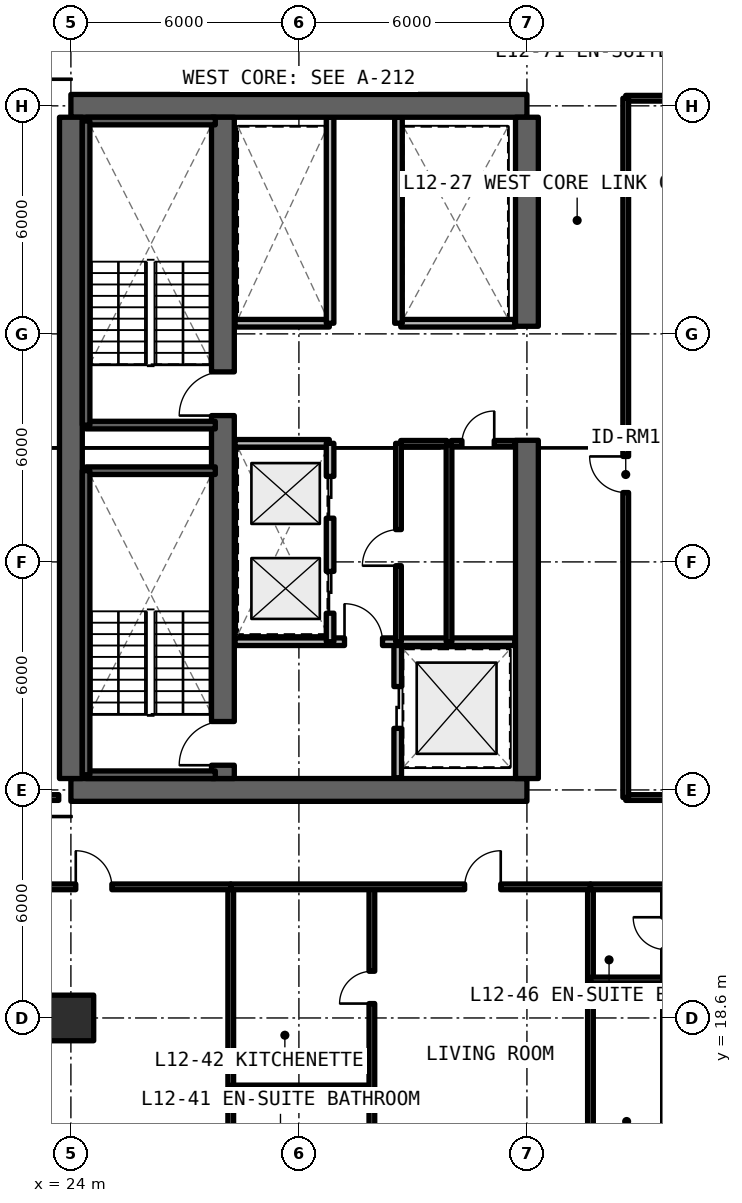
"""IFC4 building model, lengths in metres.
Left out: names, types, materials, properties, quantities, classifications, styles, units other than length and angle.
Written with IfcOpenShell. Run it as: python <this file> out.ifc"""

import sys

from ifc_helpers import new_model, si_unit, direction, frame, frame_2d, origin, origin_2d, place, context, subcontext, project, spatial, rectangle, extrude, element, fill, save


model = new_model("IFC4")
c1 = context("Model", 3, precision=1e-05, world=origin(), true_north=direction((0.0, 1.0)))
c2 = subcontext(c1, "Body", "Model", "MODEL_VIEW")
j1 = project(units=[si_unit("LENGTHUNIT", "METRE"), si_unit("PLANEANGLEUNIT", "RADIAN")], contexts=[c1])
p1 = place(None, origin())
s1 = spatial("IfcSite", under=j1, at=p1, CompositionType="ELEMENT")
p2 = place(p1, origin())
s2 = spatial("IfcBuilding", under=s1, at=p2, CompositionType="ELEMENT")
p3 = place(p2, frame((0.0, 0.0, 45.54)))
s3 = spatial("IfcBuildingStorey", under=s2, at=p3, CompositionType="ELEMENT", Elevation=45.54)
for number, where, z_axis, x_axis in (
    (1, (24.0, 24.6, 0.0), (0.0, 0.0, 1.0), (1.0, 0.0, 0.0)),
    (2, (36.0, 42.6, 0.0), (0.0, 0.0, 1.0), (-1.0, 0.0, 0.0)),
):
    element("IfcWall", number, at=place(p3, frame(where, z_axis=z_axis, x_axis=x_axis)), inside=s3, PredefinedType="SHEAR", context=c2, shape_type="SweptSolid", body=[
        extrude(rectangle(XDim=12.0, YDim=0.6, at=frame_2d((6.0, 0.0))), origin(), (0.0, 0.0, 1.0), 3.3),
    ])
p4 = place(p3, frame((24.0, 24.9, 0.0), z_axis=(0.0, 0.0, 1.0), x_axis=(0.0, 1.0, 0.0)))
e3 = element("IfcWall", 3, at=p4, inside=s3, PredefinedType="SHEAR", context=c2, shape_type="SweptSolid", body=[
    extrude(rectangle(XDim=17.4, YDim=0.6, at=frame_2d((8.7, 0.0))), origin(), (0.0, 0.0, 1.0), 3.3),
])
p5 = place(p3, frame((36.0, 24.9, 0.0), z_axis=(0.0, 0.0, 1.0), x_axis=(0.0, 1.0, 0.0)))
e4 = element("IfcWall", 4, at=p5, inside=s3, PredefinedType="SHEAR", context=c2, shape_type="SweptSolid", body=[
    extrude(rectangle(XDim=8.9, YDim=0.6, at=frame_2d((4.45, 0.0))), origin(), (0.0, 0.0, 1.0), 3.3),
])
p6 = place(p3, frame((36.0, 36.8, 0.0), z_axis=(0.0, 0.0, 1.0), x_axis=(0.0, 1.0, 0.0)))
e5 = element("IfcWall", 5, at=p6, inside=s3, PredefinedType="SHEAR", context=c2, shape_type="SweptSolid", body=[
    extrude(rectangle(XDim=5.5, YDim=0.6, at=frame_2d((2.75, 0.0))), origin(), (0.0, 0.0, 1.0), 3.3),
])
p7 = place(p3, frame((28.0, 24.9, 0.0), z_axis=(0.0, 0.0, 1.0), x_axis=(0.0, 1.0, 0.0)))
e6 = element("IfcWall", 6, at=p7, inside=s3, PredefinedType="SHEAR", context=c2, shape_type="SweptSolid", body=[
    extrude(rectangle(XDim=17.4, YDim=0.6, at=frame_2d((8.7, 0.0))), origin(), (0.0, 0.0, 1.0), 3.3),
])
p8 = place(p7, frame((0.35, 0.0, 0.0)))
e7 = element("IfcOpeningElement", 7, at=p8, cuts=e6, PredefinedType="OPENING", context=c2, shape_type="SweptSolid", body=[
    extrude(rectangle(XDim=1.15, YDim=2.15, at=frame_2d((0.575, 1.075))), frame((0.0, 0.31, 0.0), z_axis=(0.0, -1.0, 0.0), x_axis=(1.0, 0.0, 0.0)), (0.0, 0.0, 1.0), 0.62),
])
p9 = place(p7, frame((9.55, 0.0, 0.0)))
e8 = element("IfcOpeningElement", 8, at=p9, cuts=e6, PredefinedType="OPENING", context=c2, shape_type="SweptSolid", body=[
    extrude(rectangle(XDim=1.15, YDim=2.15, at=frame_2d((0.575, 1.075))), frame((0.0, 0.31, 0.0), z_axis=(0.0, -1.0, 0.0), x_axis=(1.0, 0.0, 0.0)), (0.0, 0.0, 1.0), 0.62),
])
p10 = place(p3, frame((24.0, 18.6, 0.0), z_axis=(0.0, 0.0, 1.0), x_axis=(1.0, 0.0, 0.0)))
e9 = element("IfcColumn", 9, at=p10, inside=s3, PredefinedType="COLUMN", context=c2, shape_type="SweptSolid", body=[
    extrude(rectangle(XDim=1.2, YDim=1.2, at=origin_2d()), origin(), (0.0, 0.0, 1.0), 3.3),
])
p11 = place(p3, frame((32.6, 24.92, 0.0), z_axis=(0.0, 0.0, 1.0), x_axis=(0.0, 1.0, 0.0)))
e10 = element("IfcWall", 10, at=p11, inside=s3, PredefinedType="SOLIDWALL", context=c2, shape_type="SweptSolid", body=[
    extrude(rectangle(XDim=3.58, YDim=0.2, at=frame_2d((1.79, 0.0))), origin(), (0.0, 0.0, 1.0), 2.35),
])
p12 = place(p11, frame((1.3, 0.0, 0.0)))
e11 = element("IfcOpeningElement", 11, at=p12, cuts=e10, PredefinedType="OPENING", context=c2, shape_type="SweptSolid", body=[
    extrude(rectangle(XDim=1.1, YDim=2.2, at=frame_2d((0.55, 1.1))), frame((0.0, 0.11, 0.0), z_axis=(0.0, -1.0, 0.0), x_axis=(1.0, 0.0, 0.0)), (0.0, 0.0, 1.0), 0.22),
])
p13 = place(p3, frame((28.32, 28.5, 0.0), z_axis=(0.0, 0.0, 1.0), x_axis=(1.0, 0.0, 0.0)))
e12 = element("IfcWall", 12, at=p13, inside=s3, PredefinedType="SOLIDWALL", context=c2, shape_type="SweptSolid", body=[
    extrude(rectangle(XDim=7.36, YDim=0.2, at=frame_2d((3.68, 0.0))), origin(), (0.0, 0.0, 1.0), 2.35),
])
p14 = place(p13, frame((2.88, 0.0, 0.0)))
e13 = element("IfcOpeningElement", 13, at=p14, cuts=e12, PredefinedType="OPENING", context=c2, shape_type="SweptSolid", body=[
    extrude(rectangle(XDim=1.0, YDim=2.15, at=frame_2d((0.5, 1.075))), frame((0.0, 0.11, 0.0), z_axis=(0.0, -1.0, 0.0), x_axis=(1.0, 0.0, 0.0)), (0.0, 0.0, 1.0), 0.22),
])
p15 = place(p3, frame((28.32, 33.72, 0.0), z_axis=(0.0, 0.0, 1.0), x_axis=(1.0, 0.0, 0.0)))
e14 = element("IfcWall", 14, at=p15, inside=s3, PredefinedType="SOLIDWALL", context=c2, shape_type="SweptSolid", body=[
    extrude(rectangle(XDim=2.48, YDim=0.2, at=frame_2d((1.24, 0.0))), origin(), (0.0, 0.0, 1.0), 2.35),
])
p16 = place(p3, frame((30.82, 28.5, 0.0), z_axis=(0.0, 0.0, 1.0), x_axis=(0.0, 1.0, 0.0)))
e15 = element("IfcWall", 15, at=p16, inside=s3, PredefinedType="SOLIDWALL", context=c2, shape_type="SweptSolid", body=[
    extrude(rectangle(XDim=5.22, YDim=0.2, at=frame_2d((2.61, 0.0))), origin(), (0.0, 0.0, 1.0), 2.35),
])
p17 = place(p16, frame((0.75, 0.0, 0.0)))
e16 = element("IfcOpeningElement", 16, at=p17, cuts=e15, PredefinedType="OPENING", context=c2, shape_type="SweptSolid", body=[
    extrude(rectangle(XDim=1.1, YDim=2.2, at=frame_2d((0.55, 1.1))), frame((0.0, 0.11, 0.0), z_axis=(0.0, -1.0, 0.0), x_axis=(1.0, 0.0, 0.0)), (0.0, 0.0, 1.0), 0.22),
])
p18 = place(p16, frame((3.25, 0.0, 0.0)))
e17 = element("IfcOpeningElement", 17, at=p18, cuts=e15, PredefinedType="OPENING", context=c2, shape_type="SweptSolid", body=[
    extrude(rectangle(XDim=1.1, YDim=2.2, at=frame_2d((0.55, 1.1))), frame((0.0, 0.11, 0.0), z_axis=(0.0, -1.0, 0.0), x_axis=(1.0, 0.0, 0.0)), (0.0, 0.0, 1.0), 0.22),
])
p19 = place(p3, frame((33.95, 28.5, 0.0), z_axis=(0.0, 0.0, 1.0), x_axis=(0.0, 1.0, 0.0)))
e18 = element("IfcWall", 18, at=p19, inside=s3, PredefinedType="SOLIDWALL", context=c2, shape_type="SweptSolid", body=[
    extrude(rectangle(XDim=5.22, YDim=0.15, at=frame_2d((2.61, 0.0))), origin(), (0.0, 0.0, 1.0), 2.35),
])
p20 = place(p3, frame((32.68, 33.72, 0.0), z_axis=(0.0, 0.0, 1.0), x_axis=(1.0, 0.0, 0.0)))
e19 = element("IfcWall", 19, at=p20, inside=s3, PredefinedType="SOLIDWALL", context=c2, shape_type="SweptSolid", body=[
    extrude(rectangle(XDim=1.21, YDim=0.15, at=frame_2d((0.605, 0.0))), origin(), (0.0, 0.0, 1.0), 2.35),
])
p21 = place(p3, frame((34.01, 33.72, 0.0), z_axis=(0.0, 0.0, 1.0), x_axis=(1.0, 0.0, 0.0)))
e20 = element("IfcWall", 20, at=p21, inside=s3, PredefinedType="SOLIDWALL", context=c2, shape_type="SweptSolid", body=[
    extrude(rectangle(XDim=1.67, YDim=0.15, at=frame_2d((0.835, 0.0))), origin(), (0.0, 0.0, 1.0), 2.35),
])
p22 = place(p21, frame((0.28, 0.0, 0.0)))
e21 = element("IfcOpeningElement", 21, at=p22, cuts=e20, PredefinedType="OPENING", context=c2, shape_type="SweptSolid", body=[
    extrude(rectangle(XDim=0.85, YDim=2.1, at=frame_2d((0.425, 1.05))), frame((0.0, 0.085, 0.0), z_axis=(0.0, -1.0, 0.0), x_axis=(1.0, 0.0, 0.0)), (0.0, 0.0, 1.0), 0.17),
])
p23 = place(p3, frame((32.62, 28.5, 0.0), z_axis=(0.0, 0.0, 1.0), x_axis=(0.0, 1.0, 0.0)))
e22 = element("IfcWall", 22, at=p23, inside=s3, PredefinedType="SOLIDWALL", context=c2, shape_type="SweptSolid", body=[
    extrude(rectangle(XDim=5.22, YDim=0.15, at=frame_2d((2.61, 0.0))), origin(), (0.0, 0.0, 1.0), 2.35),
])
p24 = place(p23, frame((2.0, 0.0, 0.0)))
e23 = element("IfcOpeningElement", 23, at=p24, cuts=e22, PredefinedType="OPENING", context=c2, shape_type="SweptSolid", body=[
    extrude(rectangle(XDim=0.95, YDim=2.15, at=frame_2d((0.475, 1.075))), frame((0.0, 0.085, 0.0), z_axis=(0.0, -1.0, 0.0), x_axis=(1.0, 0.0, 0.0)), (0.0, 0.0, 1.0), 0.17),
])
p25 = place(p3, frame((28.32, 36.88, 0.0), z_axis=(0.0, 0.0, 1.0), x_axis=(1.0, 0.0, 0.0)))
e24 = element("IfcWall", 24, at=p25, inside=s3, PredefinedType="SOLIDWALL", context=c2, shape_type="SweptSolid", body=[
    extrude(rectangle(XDim=2.48, YDim=0.2, at=frame_2d((1.24, 0.0))), origin(), (0.0, 0.0, 1.0), 2.35),
])
p26 = place(p3, frame((30.82, 36.88, 0.0), z_axis=(0.0, 0.0, 1.0), x_axis=(0.0, 1.0, 0.0)))
e25 = element("IfcWall", 25, at=p26, inside=s3, PredefinedType="SOLIDWALL", context=c2, shape_type="SweptSolid", body=[
    extrude(rectangle(XDim=5.42, YDim=0.2, at=frame_2d((2.71, 0.0))), origin(), (0.0, 0.0, 1.0), 2.35),
])
p27 = place(p3, frame((32.68, 36.88, 0.0), z_axis=(0.0, 0.0, 1.0), x_axis=(1.0, 0.0, 0.0)))
e26 = element("IfcWall", 26, at=p27, inside=s3, PredefinedType="SOLIDWALL", context=c2, shape_type="SweptSolid", body=[
    extrude(rectangle(XDim=3.0, YDim=0.2, at=frame_2d((1.5, 0.0))), origin(), (0.0, 0.0, 1.0), 2.35),
])
p28 = place(p3, frame((32.62, 36.88, 0.0), z_axis=(0.0, 0.0, 1.0), x_axis=(0.0, 1.0, 0.0)))
e27 = element("IfcWall", 27, at=p28, inside=s3, PredefinedType="SOLIDWALL", context=c2, shape_type="SweptSolid", body=[
    extrude(rectangle(XDim=5.42, YDim=0.2, at=frame_2d((2.71, 0.0))), origin(), (0.0, 0.0, 1.0), 2.35),
])
for number, where, z_axis, x_axis in (
    (28, (38.6, 24.4, 0.0), (0.0, 0.0, 1.0), (1.0, 0.0, 0.0)),
    (29, (38.6, 42.8, 0.0), (0.0, 0.0, 1.0), (1.0, 0.0, 0.0)),
):
    element("IfcWall", number, at=place(p3, frame(where, z_axis=z_axis, x_axis=x_axis)), inside=s3, PredefinedType="SOLIDWALL", context=c2, shape_type="SweptSolid", body=[
        extrude(rectangle(XDim=8.25, YDim=0.15, at=frame_2d((4.125, 0.0))), origin(), (0.0, 0.0, 1.0), 2.295),
    ])
p29 = place(p3, frame((38.6, 24.4, 0.0), z_axis=(0.0, 0.0, 1.0), x_axis=(0.0, 1.0, 0.0)))
e30 = element("IfcWall", 30, at=p29, inside=s3, PredefinedType="SOLIDWALL", context=c2, shape_type="SweptSolid", body=[
    extrude(rectangle(XDim=18.4, YDim=0.15, at=frame_2d((9.2, 0.0))), origin(), (0.0, 0.0, 1.0), 2.35),
])
p30 = place(p29, frame((8.025, 0.0, 0.0)))
e31 = element("IfcOpeningElement", 31, at=p30, cuts=e30, PredefinedType="OPENING", context=c2, shape_type="SweptSolid", body=[
    extrude(rectangle(XDim=0.95, YDim=2.15, at=frame_2d((0.475, 1.075))), frame((0.0, 0.085, 0.0), z_axis=(0.0, -1.0, 0.0), x_axis=(1.0, 0.0, 0.0)), (0.0, 0.0, 1.0), 0.17),
])
p31 = place(p3, frame((16.84, 24.4, 0.0), z_axis=(0.0, 0.0, 1.0), x_axis=(1.0, 0.0, 0.0)))
e32 = element("IfcWall", 32, at=p31, inside=s3, PredefinedType="SOLIDWALL", context=c2, shape_type="SweptSolid", body=[
    extrude(rectangle(XDim=6.84, YDim=0.15, at=frame_2d((3.42, 0.0))), origin(), (0.0, 0.0, 1.0), 2.295),
])
p32 = place(p31, frame((2.945, 0.0, 0.0)))
e33 = element("IfcOpeningElement", 33, at=p32, cuts=e32, PredefinedType="OPENING", context=c2, shape_type="SweptSolid", body=[
    extrude(rectangle(XDim=0.95, YDim=2.15, at=frame_2d((0.475, 1.075))), frame((0.0, 0.085, 0.0), z_axis=(0.0, -1.0, 0.0), x_axis=(1.0, 0.0, 0.0)), (0.0, 0.0, 1.0), 0.17),
])
p33 = place(p3, frame((28.207, 7.88, 0.0), z_axis=(0.0, 0.0, 1.0), x_axis=(0.0, 1.0, 0.0)))
e34 = element("IfcWall", 34, at=p33, inside=s3, PredefinedType="SOLIDWALL", context=c2, shape_type="SweptSolid", body=[
    extrude(rectangle(XDim=14.17, YDim=0.15, at=frame_2d((7.085, 0.0))), origin(), (0.0, 0.0, 1.0), 2.35),
])
p34 = place(p3, frame((21.0, 22.05, 0.0), z_axis=(0.0, 0.0, 1.0), x_axis=(1.0, 0.0, 0.0)))
e35 = element("IfcWall", 35, at=p34, inside=s3, PredefinedType="SOLIDWALL", context=c2, shape_type="SweptSolid", body=[
    extrude(rectangle(XDim=7.207, YDim=0.15, at=frame_2d((3.603, 0.0))), origin(), (0.0, 0.0, 1.0), 2.35),
])
p35 = place(p34, frame((3.128, 0.0, 0.0)))
e36 = element("IfcOpeningElement", 36, at=p35, cuts=e35, PredefinedType="OPENING", context=c2, shape_type="SweptSolid", body=[
    extrude(rectangle(XDim=0.95, YDim=2.15, at=frame_2d((0.475, 1.075))), frame((0.0, 0.085, 0.0), z_axis=(0.0, -1.0, 0.0), x_axis=(1.0, 0.0, 0.0)), (0.0, 0.0, 1.0), 0.17),
])
p36 = place(p3, frame((37.672, 7.88, 0.0), z_axis=(0.0, 0.0, 1.0), x_axis=(0.0, 1.0, 0.0)))
e37 = element("IfcWall", 37, at=p36, inside=s3, PredefinedType="SOLIDWALL", context=c2, shape_type="SweptSolid", body=[
    extrude(rectangle(XDim=14.17, YDim=0.15, at=frame_2d((7.085, 0.0))), origin(), (0.0, 0.0, 1.0), 2.35),
])
p37 = place(p3, frame((28.207, 16.758, 0.0), z_axis=(0.0, 0.0, 1.0), x_axis=(1.0, 0.0, 0.0)))
e38 = element("IfcWall", 38, at=p37, inside=s3, PredefinedType="PARTITIONING", context=c2, shape_type="SweptSolid", body=[
    extrude(rectangle(XDim=3.713, YDim=0.15, at=frame_2d((1.857, 0.0))), origin(), (0.0, 0.0, 1.0), 2.35),
])
p38 = place(p3, frame((31.92, 13.08, 0.0), z_axis=(0.0, 0.0, 1.0), x_axis=(0.0, 1.0, 0.0)))
e39 = element("IfcWall", 39, at=p38, inside=s3, PredefinedType="PARTITIONING", context=c2, shape_type="SweptSolid", body=[
    extrude(rectangle(XDim=8.97, YDim=0.15, at=frame_2d((4.485, 0.0))), origin(), (0.0, 0.0, 1.0), 2.35),
])
p39 = place(p38, frame((1.414, 0.0, 0.0)))
e40 = element("IfcOpeningElement", 40, at=p39, cuts=e39, PredefinedType="OPENING", context=c2, shape_type="SweptSolid", body=[
    extrude(rectangle(XDim=0.85, YDim=2.1, at=frame_2d((0.425, 1.05))), frame((0.0, 0.085, 0.0), z_axis=(0.0, -1.0, 0.0), x_axis=(1.0, 0.0, 0.0)), (0.0, 0.0, 1.0), 0.17),
])
p40 = place(p38, frame((5.899, 0.0, 0.0)))
e41 = element("IfcOpeningElement", 41, at=p40, cuts=e39, PredefinedType="OPENING", context=c2, shape_type="SweptSolid", body=[
    extrude(rectangle(XDim=0.85, YDim=2.1, at=frame_2d((0.425, 1.05))), frame((0.0, 0.085, 0.0), z_axis=(0.0, -1.0, 0.0), x_axis=(1.0, 0.0, 0.0)), (0.0, 0.0, 1.0), 0.17),
])
p41 = place(p3, frame((28.207, 22.05, 0.0), z_axis=(0.0, 0.0, 1.0), x_axis=(1.0, 0.0, 0.0)))
e42 = element("IfcWall", 42, at=p41, inside=s3, PredefinedType="SOLIDWALL", context=c2, shape_type="SweptSolid", body=[
    extrude(rectangle(XDim=9.465, YDim=0.15, at=frame_2d((4.733, 0.0))), origin(), (0.0, 0.0, 1.0), 2.35),
])
p42 = place(p41, frame((6.154, 0.0, 0.0)))
e43 = element("IfcOpeningElement", 43, at=p42, cuts=e42, PredefinedType="OPENING", context=c2, shape_type="SweptSolid", body=[
    extrude(rectangle(XDim=0.95, YDim=2.15, at=frame_2d((0.475, 1.075))), frame((0.0, 0.085, 0.0), z_axis=(0.0, -1.0, 0.0), x_axis=(1.0, 0.0, 0.0)), (0.0, 0.0, 1.0), 0.17),
])
p43 = place(p3, frame((37.672, 19.6, 0.0), z_axis=(0.0, 0.0, 1.0), x_axis=(1.0, 0.0, 0.0)))
e44 = element("IfcWall", 44, at=p43, inside=s3, PredefinedType="PARTITIONING", context=c2, shape_type="SweptSolid", body=[
    extrude(rectangle(XDim=1.975, YDim=0.15, at=frame_2d((0.987, 0.0))), origin(), (0.0, 0.0, 1.0), 2.35),
])
p44 = place(p3, frame((37.672, 22.05, 0.0), z_axis=(0.0, 0.0, 1.0), x_axis=(1.0, 0.0, 0.0)))
e45 = element("IfcWall", 45, at=p44, inside=s3, PredefinedType="SOLIDWALL", context=c2, shape_type="SweptSolid", body=[
    extrude(rectangle(XDim=5.808, YDim=0.15, at=frame_2d((2.904, 0.0))), origin(), (0.0, 0.0, 1.0), 2.35),
])
p45 = place(p44, frame((3.457, 0.0, 0.0)))
e46 = element("IfcOpeningElement", 46, at=p45, cuts=e45, PredefinedType="OPENING", context=c2, shape_type="SweptSolid", body=[
    extrude(rectangle(XDim=0.95, YDim=2.15, at=frame_2d((0.475, 1.075))), frame((0.0, 0.085, 0.0), z_axis=(0.0, -1.0, 0.0), x_axis=(1.0, 0.0, 0.0)), (0.0, 0.0, 1.0), 0.17),
])
for number, where, z_axis, x_axis in (
    (47, (24.4, 25.0, 0.0), (0.0, 0.0, 1.0), (1.0, 0.0, 0.0)),
    (48, (27.8, 33.0, 0.0), (0.0, 0.0, 1.0), (-1.0, 0.0, 0.0)),
):
    element("IfcWall", number, at=place(p3, frame(where, z_axis=z_axis, x_axis=x_axis)), inside=s3, PredefinedType="SOLIDWALL", context=c2, shape_type="SweptSolid", body=[
        extrude(rectangle(XDim=3.4, YDim=0.2, at=frame_2d((1.7, 0.0))), origin(), (0.0, 0.0, 1.0), 3.3),
    ])
p46 = place(p3, frame((24.4, 33.0, 0.0), z_axis=(0.0, 0.0, 1.0), x_axis=(0.0, -1.0, 0.0)))
e49 = element("IfcWall", 49, at=p46, inside=s3, PredefinedType="SOLIDWALL", context=c2, shape_type="SweptSolid", body=[
    extrude(rectangle(XDim=8.0, YDim=0.2, at=frame_2d((4.0, 0.0))), origin(), (0.0, 0.0, 1.0), 3.3),
])
for number, where, z_axis, x_axis in (
    (50, (24.4, 34.2, 0.0), (0.0, 0.0, 1.0), (1.0, 0.0, 0.0)),
    (51, (27.8, 42.2, 0.0), (0.0, 0.0, 1.0), (-1.0, 0.0, 0.0)),
):
    element("IfcWall", number, at=place(p3, frame(where, z_axis=z_axis, x_axis=x_axis)), inside=s3, PredefinedType="SOLIDWALL", context=c2, shape_type="SweptSolid", body=[
        extrude(rectangle(XDim=3.4, YDim=0.2, at=frame_2d((1.7, 0.0))), origin(), (0.0, 0.0, 1.0), 3.3),
    ])
p47 = place(p3, frame((24.4, 42.2, 0.0), z_axis=(0.0, 0.0, 1.0), x_axis=(0.0, -1.0, 0.0)))
e52 = element("IfcWall", 52, at=p47, inside=s3, PredefinedType="SOLIDWALL", context=c2, shape_type="SweptSolid", body=[
    extrude(rectangle(XDim=8.0, YDim=0.2, at=frame_2d((4.0, 0.0))), origin(), (0.0, 0.0, 1.0), 3.3),
])
p48 = place(p12, origin())
e53 = element("IfcDoor", 53, at=p48, inside=s3, OperationType="SLIDING_TO_LEFT", PredefinedType="DOOR", context=c2, shape_type="SweptSolid", body=[
    extrude(rectangle(XDim=1.1, YDim=2.2, at=frame_2d((0.55, 1.1))), frame((0.0, 0.025, 0.0), z_axis=(0.0, -1.0, 0.0), x_axis=(1.0, 0.0, 0.0)), (0.0, 0.0, 1.0), 0.05),
])
fill(e11, e53)
p49 = place(p14, origin())
e54 = element("IfcDoor", 54, at=p49, inside=s3, OperationType="SINGLE_SWING_LEFT", PredefinedType="DOOR", context=c2, shape_type="SweptSolid", body=[
    extrude(rectangle(XDim=1.0, YDim=2.15, at=frame_2d((0.5, 1.075))), frame((0.0, 0.025, 0.0), z_axis=(0.0, -1.0, 0.0), x_axis=(1.0, 0.0, 0.0)), (0.0, 0.0, 1.0), 0.05),
])
fill(e13, e54)
p50 = place(p17, origin())
e55 = element("IfcDoor", 55, at=p50, inside=s3, OperationType="SLIDING_TO_LEFT", PredefinedType="DOOR", context=c2, shape_type="SweptSolid", body=[
    extrude(rectangle(XDim=1.1, YDim=2.2, at=frame_2d((0.55, 1.1))), frame((0.0, 0.025, 0.0), z_axis=(0.0, -1.0, 0.0), x_axis=(1.0, 0.0, 0.0)), (0.0, 0.0, 1.0), 0.05),
])
fill(e16, e55)
p51 = place(p18, origin())
e56 = element("IfcDoor", 56, at=p51, inside=s3, OperationType="SLIDING_TO_RIGHT", PredefinedType="DOOR", context=c2, shape_type="SweptSolid", body=[
    extrude(rectangle(XDim=1.1, YDim=2.2, at=frame_2d((0.55, 1.1))), frame((0.0, 0.025, 0.0), z_axis=(0.0, -1.0, 0.0), x_axis=(1.0, 0.0, 0.0)), (0.0, 0.0, 1.0), 0.05),
])
fill(e17, e56)
p52 = place(p22, origin())
e57 = element("IfcDoor", 57, at=p52, inside=s3, OperationType="SINGLE_SWING_RIGHT", PredefinedType="DOOR", context=c2, shape_type="SweptSolid", body=[
    extrude(rectangle(XDim=0.85, YDim=2.1, at=frame_2d((0.425, 1.05))), frame((0.0, 0.025, 0.0), z_axis=(0.0, -1.0, 0.0), x_axis=(1.0, 0.0, 0.0)), (0.0, 0.0, 1.0), 0.05),
])
fill(e21, e57)
p53 = place(p24, origin())
e58 = element("IfcDoor", 58, at=p53, inside=s3, OperationType="SINGLE_SWING_LEFT", PredefinedType="DOOR", context=c2, shape_type="SweptSolid", body=[
    extrude(rectangle(XDim=0.95, YDim=2.15, at=frame_2d((0.475, 1.075))), frame((0.0, 0.025, 0.0), z_axis=(0.0, -1.0, 0.0), x_axis=(1.0, 0.0, 0.0)), (0.0, 0.0, 1.0), 0.05),
])
fill(e23, e58)
p54 = place(p30, origin())
e59 = element("IfcDoor", 59, at=p54, inside=s3, OperationType="SINGLE_SWING_RIGHT", PredefinedType="DOOR", context=c2, shape_type="SweptSolid", body=[
    extrude(rectangle(XDim=0.95, YDim=2.15, at=frame_2d((0.475, 1.075))), frame((0.0, 0.025, 0.0), z_axis=(0.0, -1.0, 0.0), x_axis=(1.0, 0.0, 0.0)), (0.0, 0.0, 1.0), 0.05),
])
fill(e31, e59)
p55 = place(p35, origin())
e60 = element("IfcDoor", 60, at=p55, inside=s3, OperationType="SINGLE_SWING_LEFT", PredefinedType="DOOR", context=c2, shape_type="SweptSolid", body=[
    extrude(rectangle(XDim=0.95, YDim=2.15, at=frame_2d((0.475, 1.075))), frame((0.0, 0.025, 0.0), z_axis=(0.0, -1.0, 0.0), x_axis=(1.0, 0.0, 0.0)), (0.0, 0.0, 1.0), 0.05),
])
fill(e36, e60)
p56 = place(p40, origin())
e61 = element("IfcDoor", 61, at=p56, inside=s3, OperationType="SINGLE_SWING_LEFT", PredefinedType="DOOR", context=c2, shape_type="SweptSolid", body=[
    extrude(rectangle(XDim=0.85, YDim=2.1, at=frame_2d((0.425, 1.05))), frame((0.0, 0.025, 0.0), z_axis=(0.0, -1.0, 0.0), x_axis=(1.0, 0.0, 0.0)), (0.0, 0.0, 1.0), 0.05),
])
fill(e41, e61)
p57 = place(p42, origin())
e62 = element("IfcDoor", 62, at=p57, inside=s3, OperationType="SINGLE_SWING_RIGHT", PredefinedType="DOOR", context=c2, shape_type="SweptSolid", body=[
    extrude(rectangle(XDim=0.95, YDim=2.15, at=frame_2d((0.475, 1.075))), frame((0.0, 0.025, 0.0), z_axis=(0.0, -1.0, 0.0), x_axis=(1.0, 0.0, 0.0)), (0.0, 0.0, 1.0), 0.05),
])
fill(e43, e62)
p58 = place(p8, origin())
e63 = element("IfcDoor", 63, at=p58, inside=s3, OperationType="SINGLE_SWING_LEFT", PredefinedType="DOOR", context=c2, shape_type="SweptSolid", body=[
    extrude(rectangle(XDim=1.15, YDim=2.15, at=frame_2d((0.575, 1.075))), frame((0.0, 0.025, 0.0), z_axis=(0.0, -1.0, 0.0), x_axis=(1.0, 0.0, 0.0)), (0.0, 0.0, 1.0), 0.05),
])
fill(e7, e63)
p59 = place(p9, origin())
e64 = element("IfcDoor", 64, at=p59, inside=s3, OperationType="SINGLE_SWING_RIGHT", PredefinedType="DOOR", context=c2, shape_type="SweptSolid", body=[
    extrude(rectangle(XDim=1.15, YDim=2.15, at=frame_2d((0.575, 1.075))), frame((0.0, 0.025, 0.0), z_axis=(0.0, -1.0, 0.0), x_axis=(1.0, 0.0, 0.0)), (0.0, 0.0, 1.0), 0.05),
])
fill(e8, e64)
save(model, sys.argv[1])
